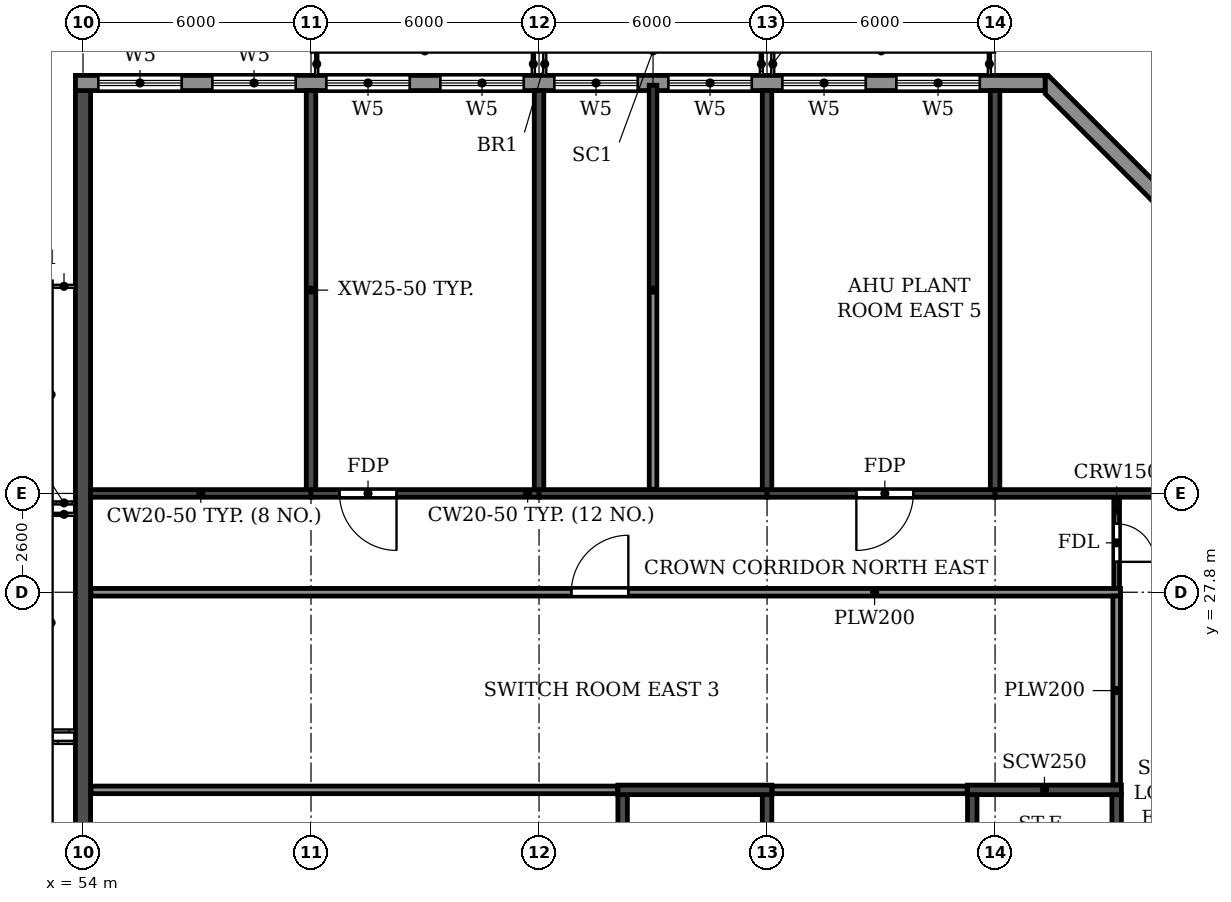
"""IFC4 building model, lengths in metres.
Left out: names, types, materials, properties, quantities, classifications, styles, units other than length and angle.
Written with IfcOpenShell. Run it as: python <this file> out.ifc"""

import sys

from ifc_helpers import new_model, si_unit, direction, frame, frame_2d, origin, place, context, subcontext, project, spatial, polyline, rectangle, outline, extrude, element, fill, save


model = new_model("IFC4")
c1 = context("Model", 3, precision=1e-05, world=origin(), true_north=direction((0.0, 1.0)))
c2 = subcontext(c1, "Body", "Model", "MODEL_VIEW")
j1 = project(units=[si_unit("LENGTHUNIT", "METRE"), si_unit("PLANEANGLEUNIT", "RADIAN")], contexts=[c1])
p1 = place(None, origin())
s1 = spatial("IfcSite", under=j1, at=p1, CompositionType="ELEMENT")
p2 = place(p1, origin())
s2 = spatial("IfcBuilding", under=s1, at=p2, CompositionType="ELEMENT")
p3 = place(p2, frame((0.0, 0.0, 275.7)))
s3 = spatial("IfcBuildingStorey", under=s2, at=p3, CompositionType="ELEMENT", Elevation=275.7)
for number, where, z_axis, x_axis in (
    (1, (60.0, 30.5, 0.0), (0.0, 0.0, 1.0), (0.0, 1.0, 0.0)),
    (2, (66.0, 30.5, 0.0), (0.0, 0.0, 1.0), (0.0, 1.0, 0.0)),
    (3, (72.0, 30.5, 0.0), (0.0, 0.0, 1.0), (0.0, 1.0, 0.0)),
    (4, (78.0, 30.5, 0.0), (0.0, 0.0, 1.0), (0.0, 1.0, 0.0)),
):
    element("IfcWall", number, at=place(p3, frame(where, z_axis=z_axis, x_axis=x_axis)), inside=s3, PredefinedType="SHEAR", context=c2, shape_type="SweptSolid", body=[
        extrude(rectangle(XDim=10.5, YDim=0.25, at=frame_2d((5.25, 0.0))), origin(), (0.0, 0.0, 1.0), 3.05),
    ])
p4 = place(p3, frame((54.0, 0.2, 0.0), z_axis=(0.0, 0.0, 1.0), x_axis=(0.0, 1.0, 0.0)))
e5 = element("IfcWall", 5, at=p4, inside=s3, PredefinedType="SHEAR", context=c2, shape_type="SweptSolid", body=[
    extrude(rectangle(XDim=40.8, YDim=0.4, at=frame_2d((20.4, 0.0))), origin(), (0.0, 0.0, 1.0), 3.05),
])
p5 = place(p3, frame((54.2, 30.4, 0.0), z_axis=(0.0, 0.0, 1.0), x_axis=(1.0, 0.0, 0.0)))
e6 = element("IfcWall", 6, at=p5, inside=s3, PredefinedType="SHEAR", context=c2, shape_type="SweptSolid", body=[
    extrude(rectangle(XDim=5.8, YDim=0.2, at=frame_2d((2.9, 0.0))), origin(), (0.0, 0.0, 1.0), 2.45),
])
p6 = place(p3, frame((60.0, 30.4, 0.0), z_axis=(0.0, 0.0, 1.0), x_axis=(1.0, 0.0, 0.0)))
e7 = element("IfcWall", 7, at=p6, inside=s3, PredefinedType="SHEAR", context=c2, shape_type="SweptSolid", body=[
    extrude(rectangle(XDim=6.0, YDim=0.2, at=frame_2d((3.0, 0.0))), origin(), (0.0, 0.0, 1.0), 2.45),
])
p7 = place(p6, frame((0.75, 0.0, 0.0)))
e8 = element("IfcOpeningElement", 8, at=p7, cuts=e7, PredefinedType="OPENING", context=c2, shape_type="SweptSolid", body=[
    extrude(rectangle(XDim=1.5, YDim=2.1, at=frame_2d((0.75, 1.05))), frame((0.0, 0.11, 0.0), z_axis=(0.0, -1.0, 0.0), x_axis=(1.0, 0.0, 0.0)), (0.0, 0.0, 1.0), 0.22),
])
p8 = place(p3, frame((66.0, 30.4, 0.0), z_axis=(0.0, 0.0, 1.0), x_axis=(1.0, 0.0, 0.0)))
e9 = element("IfcWall", 9, at=p8, inside=s3, PredefinedType="SHEAR", context=c2, shape_type="SweptSolid", body=[
    extrude(rectangle(XDim=6.0, YDim=0.2, at=frame_2d((3.0, 0.0))), origin(), (0.0, 0.0, 1.0), 2.45),
])
p9 = place(p3, frame((72.0, 30.4, 0.0), z_axis=(0.0, 0.0, 1.0), x_axis=(1.0, 0.0, 0.0)))
e10 = element("IfcWall", 10, at=p9, inside=s3, PredefinedType="SHEAR", context=c2, shape_type="SweptSolid", body=[
    extrude(rectangle(XDim=6.0, YDim=0.2, at=frame_2d((3.0, 0.0))), origin(), (0.0, 0.0, 1.0), 2.45),
])
p10 = place(p9, frame((2.35, 0.0, 0.0)))
e11 = element("IfcOpeningElement", 11, at=p10, cuts=e10, PredefinedType="OPENING", context=c2, shape_type="SweptSolid", body=[
    extrude(rectangle(XDim=1.5, YDim=2.1, at=frame_2d((0.75, 1.05))), frame((0.0, 0.11, 0.0), z_axis=(0.0, -1.0, 0.0), x_axis=(1.0, 0.0, 0.0)), (0.0, 0.0, 1.0), 0.22),
])
p11 = place(p3, frame((78.0, 30.4, 0.0), z_axis=(0.0, 0.0, 1.0), x_axis=(1.0, 0.0, 0.0)))
e12 = element("IfcWall", 12, at=p11, inside=s3, PredefinedType="SHEAR", context=c2, shape_type="SweptSolid", body=[
    extrude(rectangle(XDim=5.8, YDim=0.2, at=frame_2d((2.9, 0.0))), origin(), (0.0, 0.0, 1.0), 2.45),
])
p12 = place(p3, frame((77.4, 14.6, 0.0), z_axis=(0.0, 0.0, 1.0), x_axis=(0.0, 1.0, 0.0)))
e13 = element("IfcWall", 13, at=p12, inside=s3, PredefinedType="SOLIDWALL", context=c2, shape_type="SweptSolid", body=[
    extrude(rectangle(XDim=7.875, YDim=0.25, at=frame_2d((3.938, 0.0))), origin(), (0.0, 0.0, 1.0), 3.05),
])
p13 = place(p3, frame((81.2, 14.6, 0.0), z_axis=(0.0, 0.0, 1.0), x_axis=(0.0, 1.0, 0.0)))
e14 = element("IfcWall", 14, at=p13, inside=s3, PredefinedType="SOLIDWALL", context=c2, shape_type="SweptSolid", body=[
    extrude(rectangle(XDim=7.875, YDim=0.25, at=frame_2d((3.938, 0.0))), origin(), (0.0, 0.0, 1.0), 3.05),
])
p14 = place(p13, frame((0.7, 0.0, 0.0)))
e15 = element("IfcOpeningElement", 15, at=p14, cuts=e14, PredefinedType="OPENING", context=c2, shape_type="SweptSolid", body=[
    extrude(rectangle(XDim=1.0, YDim=2.1, at=frame_2d((0.5, 1.05))), frame((0.0, 0.135, 0.0), z_axis=(0.0, -1.0, 0.0), x_axis=(1.0, 0.0, 0.0)), (0.0, 0.0, 1.0), 0.27),
])
p15 = place(p3, frame((77.275, 22.6, 0.0), z_axis=(0.0, 0.0, 1.0), x_axis=(1.0, 0.0, 0.0)))
e16 = element("IfcWall", 16, at=p15, inside=s3, PredefinedType="SOLIDWALL", context=c2, shape_type="SweptSolid", body=[
    extrude(rectangle(XDim=4.05, YDim=0.25, at=frame_2d((2.025, 0.0))), origin(), (0.0, 0.0, 1.0), 3.05),
])
for number, where, z_axis, x_axis in (
    (17, (68.2, 14.6, 0.0), (0.0, 0.0, 1.0), (0.0, 1.0, 0.0)),
    (18, (72.0, 14.6, 0.0), (0.0, 0.0, 1.0), (0.0, 1.0, 0.0)),
):
    element("IfcWall", number, at=place(p3, frame(where, z_axis=z_axis, x_axis=x_axis)), inside=s3, PredefinedType="SOLIDWALL", context=c2, shape_type="SweptSolid", body=[
        extrude(rectangle(XDim=7.875, YDim=0.25, at=frame_2d((3.938, 0.0))), origin(), (0.0, 0.0, 1.0), 3.05),
    ])
p16 = place(p3, frame((68.075, 22.6, 0.0), z_axis=(0.0, 0.0, 1.0), x_axis=(1.0, 0.0, 0.0)))
e19 = element("IfcWall", 19, at=p16, inside=s3, PredefinedType="SOLIDWALL", context=c2, shape_type="SweptSolid", body=[
    extrude(rectangle(XDim=4.05, YDim=0.25, at=frame_2d((2.025, 0.0))), origin(), (0.0, 0.0, 1.0), 3.05),
])
p17 = place(p3, origin())
e20 = element("IfcWall", 20, at=p17, inside=s3, PredefinedType="STANDARD", context=c2, shape_type="SweptSolid", body=[
    extrude(outline(polyline([(84.2, 36.517), (84.2, 36.6), (79.4, 41.4), (79.317, 41.4), (79.317, 40.917), (83.717, 36.517), (84.2, 36.517)])), origin(), (0.0, 0.0, 1.0), 3.05),
])
p18 = place(p3, frame((79.317, 41.2, 0.0), z_axis=(0.0, 0.0, 1.0), x_axis=(-1.0, 0.0, 0.0)))
e21 = element("IfcWall", 21, at=p18, inside=s3, PredefinedType="STANDARD", context=c2, shape_type="SweptSolid", body=[
    extrude(rectangle(XDim=25.517, YDim=0.4, at=frame_2d((12.759, 0.0))), origin(), (0.0, 0.0, 1.0), 3.05),
])
p19 = place(p18, frame((22.717, 0.0, 0.6)))
e22 = element("IfcOpeningElement", 22, at=p19, cuts=e21, PredefinedType="OPENING", context=c2, shape_type="SweptSolid", body=[
    extrude(rectangle(XDim=2.2, YDim=2.4, at=frame_2d((1.1, 1.2))), frame((0.0, 0.21, 0.0), z_axis=(0.0, -1.0, 0.0), x_axis=(1.0, 0.0, 0.0)), (0.0, 0.0, 1.0), 0.42),
])
p20 = place(p18, frame((19.717, 0.0, 0.6)))
e23 = element("IfcOpeningElement", 23, at=p20, cuts=e21, PredefinedType="OPENING", context=c2, shape_type="SweptSolid", body=[
    extrude(rectangle(XDim=2.2, YDim=2.4, at=frame_2d((1.1, 1.2))), frame((0.0, 0.21, 0.0), z_axis=(0.0, -1.0, 0.0), x_axis=(1.0, 0.0, 0.0)), (0.0, 0.0, 1.0), 0.42),
])
p21 = place(p18, frame((16.717, 0.0, 0.6)))
e24 = element("IfcOpeningElement", 24, at=p21, cuts=e21, PredefinedType="OPENING", context=c2, shape_type="SweptSolid", body=[
    extrude(rectangle(XDim=2.2, YDim=2.4, at=frame_2d((1.1, 1.2))), frame((0.0, 0.21, 0.0), z_axis=(0.0, -1.0, 0.0), x_axis=(1.0, 0.0, 0.0)), (0.0, 0.0, 1.0), 0.42),
])
p22 = place(p18, frame((13.717, 0.0, 0.6)))
e25 = element("IfcOpeningElement", 25, at=p22, cuts=e21, PredefinedType="OPENING", context=c2, shape_type="SweptSolid", body=[
    extrude(rectangle(XDim=2.2, YDim=2.4, at=frame_2d((1.1, 1.2))), frame((0.0, 0.21, 0.0), z_axis=(0.0, -1.0, 0.0), x_axis=(1.0, 0.0, 0.0)), (0.0, 0.0, 1.0), 0.42),
])
p23 = place(p18, frame((10.717, 0.0, 0.6)))
e26 = element("IfcOpeningElement", 26, at=p23, cuts=e21, PredefinedType="OPENING", context=c2, shape_type="SweptSolid", body=[
    extrude(rectangle(XDim=2.2, YDim=2.4, at=frame_2d((1.1, 1.2))), frame((0.0, 0.21, 0.0), z_axis=(0.0, -1.0, 0.0), x_axis=(1.0, 0.0, 0.0)), (0.0, 0.0, 1.0), 0.42),
])
p24 = place(p18, frame((7.717, 0.0, 0.6)))
e27 = element("IfcOpeningElement", 27, at=p24, cuts=e21, PredefinedType="OPENING", context=c2, shape_type="SweptSolid", body=[
    extrude(rectangle(XDim=2.2, YDim=2.4, at=frame_2d((1.1, 1.2))), frame((0.0, 0.21, 0.0), z_axis=(0.0, -1.0, 0.0), x_axis=(1.0, 0.0, 0.0)), (0.0, 0.0, 1.0), 0.42),
])
p25 = place(p18, frame((4.717, 0.0, 0.6)))
e28 = element("IfcOpeningElement", 28, at=p25, cuts=e21, PredefinedType="OPENING", context=c2, shape_type="SweptSolid", body=[
    extrude(rectangle(XDim=2.2, YDim=2.4, at=frame_2d((1.1, 1.2))), frame((0.0, 0.21, 0.0), z_axis=(0.0, -1.0, 0.0), x_axis=(1.0, 0.0, 0.0)), (0.0, 0.0, 1.0), 0.42),
])
p26 = place(p18, frame((1.717, 0.0, 0.6)))
e29 = element("IfcOpeningElement", 29, at=p26, cuts=e21, PredefinedType="OPENING", context=c2, shape_type="SweptSolid", body=[
    extrude(rectangle(XDim=2.2, YDim=2.4, at=frame_2d((1.1, 1.2))), frame((0.0, 0.21, 0.0), z_axis=(0.0, -1.0, 0.0), x_axis=(1.0, 0.0, 0.0)), (0.0, 0.0, 1.0), 0.42),
])
p27 = place(p3, frame((81.2, 27.9, 0.0), z_axis=(0.0, 0.0, 1.0), x_axis=(0.0, 1.0, 0.0)))
e30 = element("IfcWall", 30, at=p27, inside=s3, PredefinedType="PARTITIONING", context=c2, shape_type="SweptSolid", body=[
    extrude(rectangle(XDim=2.39, YDim=0.15, at=frame_2d((1.195, 0.0))), origin(), (0.0, 0.0, 1.0), 3.05),
])
p28 = place(p27, frame((0.7, 0.0, 0.0)))
e31 = element("IfcOpeningElement", 31, at=p28, cuts=e30, PredefinedType="OPENING", context=c2, shape_type="SweptSolid", body=[
    extrude(rectangle(XDim=1.0, YDim=2.1, at=frame_2d((0.5, 1.05))), frame((0.0, 0.085, 0.0), z_axis=(0.0, -1.0, 0.0), x_axis=(1.0, 0.0, 0.0)), (0.0, 0.0, 1.0), 0.17),
])
p29 = place(p3, frame((54.21, 22.6, 0.0), z_axis=(0.0, 0.0, 1.0), x_axis=(1.0, 0.0, 0.0)))
e32 = element("IfcWall", 32, at=p29, inside=s3, PredefinedType="PARTITIONING", context=c2, shape_type="SweptSolid", body=[
    extrude(rectangle(XDim=13.855, YDim=0.2, at=frame_2d((6.927, 0.0))), origin(), (0.0, 0.0, 1.0), 3.05),
])
p30 = place(p3, frame((72.135, 22.6, 0.0), z_axis=(0.0, 0.0, 1.0), x_axis=(1.0, 0.0, 0.0)))
e33 = element("IfcWall", 33, at=p30, inside=s3, PredefinedType="PARTITIONING", context=c2, shape_type="SweptSolid", body=[
    extrude(rectangle(XDim=5.13, YDim=0.2, at=frame_2d((2.565, 0.0))), origin(), (0.0, 0.0, 1.0), 3.05),
])
p31 = place(p3, frame((54.21, 27.8, 0.0), z_axis=(0.0, 0.0, 1.0), x_axis=(1.0, 0.0, 0.0)))
e34 = element("IfcWall", 34, at=p31, inside=s3, PredefinedType="PARTITIONING", context=c2, shape_type="SweptSolid", body=[
    extrude(rectangle(XDim=27.09, YDim=0.2, at=frame_2d((13.545, 0.0))), origin(), (0.0, 0.0, 1.0), 3.05),
])
p32 = place(p31, frame((12.64, 0.0, 0.0)))
e35 = element("IfcOpeningElement", 35, at=p32, cuts=e34, PredefinedType="OPENING", context=c2, shape_type="SweptSolid", body=[
    extrude(rectangle(XDim=1.5, YDim=2.1, at=frame_2d((0.75, 1.05))), frame((0.0, 0.11, 0.0), z_axis=(0.0, -1.0, 0.0), x_axis=(1.0, 0.0, 0.0)), (0.0, 0.0, 1.0), 0.22),
])
p33 = place(p3, frame((69.0, 30.51, 0.0), z_axis=(0.0, 0.0, 1.0), x_axis=(0.0, 1.0, 0.0)))
e36 = element("IfcWall", 36, at=p33, inside=s3, PredefinedType="PARTITIONING", context=c2, shape_type="SweptSolid", body=[
    extrude(rectangle(XDim=10.63, YDim=0.2, at=frame_2d((5.315, 0.0))), origin(), (0.0, 0.0, 1.0), 3.05),
])
p34 = place(p3, frame((81.2, 22.735, 0.0), z_axis=(0.0, 0.0, 1.0), x_axis=(0.0, 1.0, 0.0)))
e37 = element("IfcWall", 37, at=p34, inside=s3, PredefinedType="PARTITIONING", context=c2, shape_type="SweptSolid", body=[
    extrude(rectangle(XDim=4.965, YDim=0.2, at=frame_2d((2.482, 0.0))), origin(), (0.0, 0.0, 1.0), 3.05),
])
p35 = place(p19, origin())
e38 = element("IfcWindow", 38, at=p35, inside=s3, PartitioningType="TRIPLE_PANEL_HORIZONTAL", PredefinedType="WINDOW", context=c2, shape_type="SweptSolid", body=[
    extrude(rectangle(XDim=2.2, YDim=2.4, at=frame_2d((1.1, 1.2))), frame((0.0, 0.03, 0.0), z_axis=(0.0, -1.0, 0.0), x_axis=(1.0, 0.0, 0.0)), (0.0, 0.0, 1.0), 0.06),
])
fill(e22, e38)
p36 = place(p20, origin())
e39 = element("IfcWindow", 39, at=p36, inside=s3, PartitioningType="TRIPLE_PANEL_HORIZONTAL", PredefinedType="WINDOW", context=c2, shape_type="SweptSolid", body=[
    extrude(rectangle(XDim=2.2, YDim=2.4, at=frame_2d((1.1, 1.2))), frame((0.0, 0.03, 0.0), z_axis=(0.0, -1.0, 0.0), x_axis=(1.0, 0.0, 0.0)), (0.0, 0.0, 1.0), 0.06),
])
fill(e23, e39)
p37 = place(p21, origin())
e40 = element("IfcWindow", 40, at=p37, inside=s3, PartitioningType="TRIPLE_PANEL_HORIZONTAL", PredefinedType="WINDOW", context=c2, shape_type="SweptSolid", body=[
    extrude(rectangle(XDim=2.2, YDim=2.4, at=frame_2d((1.1, 1.2))), frame((0.0, 0.03, 0.0), z_axis=(0.0, -1.0, 0.0), x_axis=(1.0, 0.0, 0.0)), (0.0, 0.0, 1.0), 0.06),
])
fill(e24, e40)
p38 = place(p22, origin())
e41 = element("IfcWindow", 41, at=p38, inside=s3, PartitioningType="TRIPLE_PANEL_HORIZONTAL", PredefinedType="WINDOW", context=c2, shape_type="SweptSolid", body=[
    extrude(rectangle(XDim=2.2, YDim=2.4, at=frame_2d((1.1, 1.2))), frame((0.0, 0.03, 0.0), z_axis=(0.0, -1.0, 0.0), x_axis=(1.0, 0.0, 0.0)), (0.0, 0.0, 1.0), 0.06),
])
fill(e25, e41)
p39 = place(p23, origin())
e42 = element("IfcWindow", 42, at=p39, inside=s3, PartitioningType="TRIPLE_PANEL_HORIZONTAL", PredefinedType="WINDOW", context=c2, shape_type="SweptSolid", body=[
    extrude(rectangle(XDim=2.2, YDim=2.4, at=frame_2d((1.1, 1.2))), frame((0.0, 0.03, 0.0), z_axis=(0.0, -1.0, 0.0), x_axis=(1.0, 0.0, 0.0)), (0.0, 0.0, 1.0), 0.06),
])
fill(e26, e42)
p40 = place(p24, origin())
e43 = element("IfcWindow", 43, at=p40, inside=s3, PartitioningType="TRIPLE_PANEL_HORIZONTAL", PredefinedType="WINDOW", context=c2, shape_type="SweptSolid", body=[
    extrude(rectangle(XDim=2.2, YDim=2.4, at=frame_2d((1.1, 1.2))), frame((0.0, 0.03, 0.0), z_axis=(0.0, -1.0, 0.0), x_axis=(1.0, 0.0, 0.0)), (0.0, 0.0, 1.0), 0.06),
])
fill(e27, e43)
p41 = place(p25, origin())
e44 = element("IfcWindow", 44, at=p41, inside=s3, PartitioningType="TRIPLE_PANEL_HORIZONTAL", PredefinedType="WINDOW", context=c2, shape_type="SweptSolid", body=[
    extrude(rectangle(XDim=2.2, YDim=2.4, at=frame_2d((1.1, 1.2))), frame((0.0, 0.03, 0.0), z_axis=(0.0, -1.0, 0.0), x_axis=(1.0, 0.0, 0.0)), (0.0, 0.0, 1.0), 0.06),
])
fill(e28, e44)
p42 = place(p26, origin())
e45 = element("IfcWindow", 45, at=p42, inside=s3, PartitioningType="TRIPLE_PANEL_HORIZONTAL", PredefinedType="WINDOW", context=c2, shape_type="SweptSolid", body=[
    extrude(rectangle(XDim=2.2, YDim=2.4, at=frame_2d((1.1, 1.2))), frame((0.0, 0.03, 0.0), z_axis=(0.0, -1.0, 0.0), x_axis=(1.0, 0.0, 0.0)), (0.0, 0.0, 1.0), 0.06),
])
fill(e29, e45)
p43 = place(p7, frame((1.5, 0.0, 0.0), z_axis=(0.0, 0.0, 1.0), x_axis=(-1.0, 0.0, 0.0)))
e46 = element("IfcDoor", 46, at=p43, inside=s3, OperationType="DOUBLE_DOOR_SINGLE_SWING", PredefinedType="DOOR", context=c2, shape_type="SweptSolid", body=[
    extrude(rectangle(XDim=1.5, YDim=2.1, at=frame_2d((0.75, 1.05))), frame((0.0, 0.025, 0.0), z_axis=(0.0, -1.0, 0.0), x_axis=(1.0, 0.0, 0.0)), (0.0, 0.0, 1.0), 0.05),
])
fill(e8, e46)
p44 = place(p32, origin())
e47 = element("IfcDoor", 47, at=p44, inside=s3, OperationType="DOUBLE_DOOR_SINGLE_SWING", PredefinedType="DOOR", context=c2, shape_type="SweptSolid", body=[
    extrude(rectangle(XDim=1.5, YDim=2.1, at=frame_2d((0.75, 1.05))), frame((0.0, 0.025, 0.0), z_axis=(0.0, -1.0, 0.0), x_axis=(1.0, 0.0, 0.0)), (0.0, 0.0, 1.0), 0.05),
])
fill(e35, e47)
p45 = place(p10, frame((1.5, 0.0, 0.0), z_axis=(0.0, 0.0, 1.0), x_axis=(-1.0, 0.0, 0.0)))
e48 = element("IfcDoor", 48, at=p45, inside=s3, OperationType="DOUBLE_DOOR_SINGLE_SWING", PredefinedType="DOOR", context=c2, shape_type="SweptSolid", body=[
    extrude(rectangle(XDim=1.5, YDim=2.1, at=frame_2d((0.75, 1.05))), frame((0.0, 0.025, 0.0), z_axis=(0.0, -1.0, 0.0), x_axis=(1.0, 0.0, 0.0)), (0.0, 0.0, 1.0), 0.05),
])
fill(e11, e48)
p46 = place(p28, frame((1.0, 0.0, 0.0), z_axis=(0.0, 0.0, 1.0), x_axis=(-1.0, 0.0, 0.0)))
e49 = element("IfcDoor", 49, at=p46, inside=s3, OperationType="SINGLE_SWING_RIGHT", PredefinedType="DOOR", context=c2, shape_type="SweptSolid", body=[
    extrude(rectangle(XDim=1.0, YDim=2.1, at=frame_2d((0.5, 1.05))), frame((0.0, 0.025, 0.0), z_axis=(0.0, -1.0, 0.0), x_axis=(1.0, 0.0, 0.0)), (0.0, 0.0, 1.0), 0.05),
])
fill(e31, e49)
save(model, sys.argv[1])
